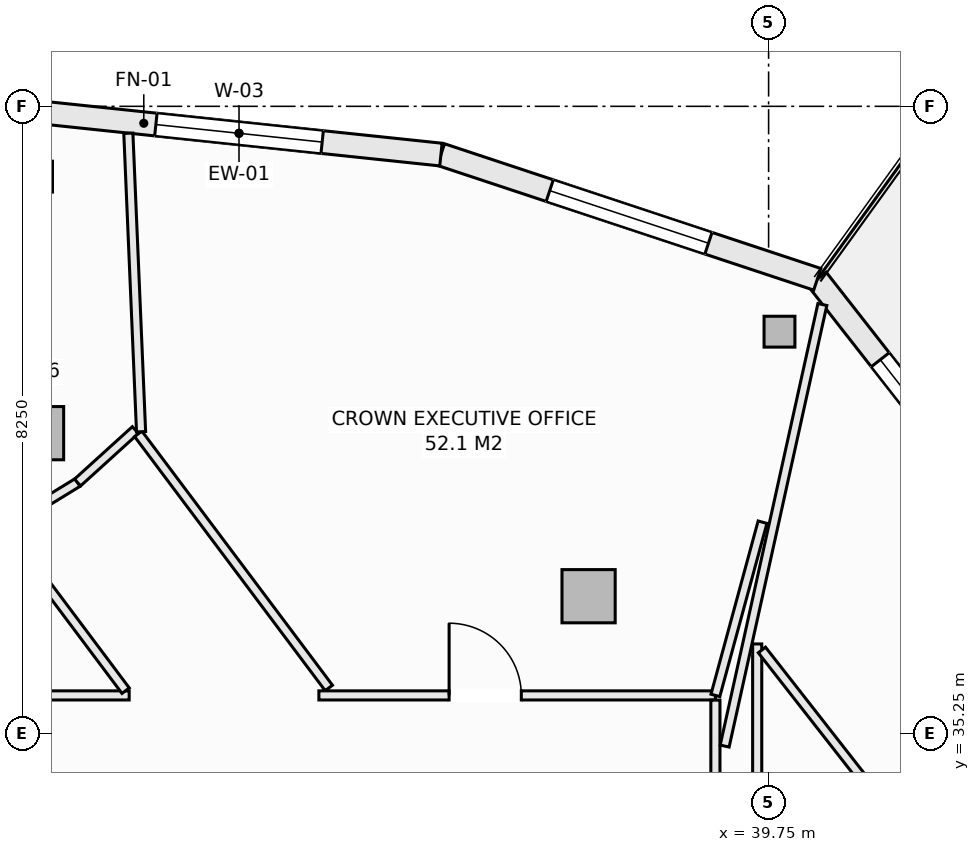
"""IFC4 building model, lengths in metres.
Left out: names, types, materials, properties, quantities, classifications, styles, units other than length and angle.
Written with IfcOpenShell. Run it as: python <this file> out.ifc"""

import sys

from ifc_helpers import new_model, si_unit, direction, frame, frame_2d, origin, origin_2d, place, context, subcontext, project, spatial, rectangle, hollow_rectangle, extrude, element, fill, save


model = new_model("IFC4")
c1 = context("Model", 3, precision=1e-05, world=origin(), true_north=direction((0.0, 1.0)))
c2 = subcontext(c1, "Body", "Model", "MODEL_VIEW")
j1 = project(units=[si_unit("LENGTHUNIT", "METRE"), si_unit("PLANEANGLEUNIT", "RADIAN")], contexts=[c1])
p1 = place(None, origin())
s1 = spatial("IfcSite", under=j1, at=p1, CompositionType="ELEMENT")
p2 = place(p1, origin())
s2 = spatial("IfcBuilding", under=s1, at=p2, CompositionType="ELEMENT")
p3 = place(p2, frame((0.0, 0.0, 259.1)))
s3 = spatial("IfcBuildingStorey", under=s2, at=p3, CompositionType="ELEMENT", Elevation=259.1)
for number, where, z_axis, x_axis in (
    (1, (39.893, 40.535, -0.27), (0.0, 0.0, 1.0), (1.0, 0.0, 0.0)),
    (2, (30.125, 42.575, -0.27), (0.0, 0.0, 1.0), (1.0, 0.0, 0.0)),
):
    element("IfcColumn", number, at=place(p3, frame(where, z_axis=z_axis, x_axis=x_axis)), inside=s3, PredefinedType="COLUMN", context=c2, shape_type="SweptSolid", body=[
        extrude(hollow_rectangle(XDim=0.406, YDim=0.406, WallThickness=0.016, at=origin_2d()), origin(), (0.0, 0.0, 1.0), 3.3),
    ])
for number, where, z_axis, x_axis in (
    (3, (37.382, 37.055, -0.27), (0.0, 0.0, 1.0), (1.0, 0.0, 0.0)),
    (4, (30.125, 39.2, -0.27), (0.0, 0.0, 1.0), (1.0, 0.0, 0.0)),
):
    element("IfcColumn", number, at=place(p3, frame(where, z_axis=z_axis, x_axis=x_axis)), inside=s3, PredefinedType="COLUMN", context=c2, shape_type="SweptSolid", body=[
        extrude(rectangle(XDim=0.7, YDim=0.7, at=origin_2d()), origin(), (0.0, 0.0, 1.0), 3.3),
    ])
p4 = place(p3, frame((40.391, 41.225, 0.0), z_axis=(0.0, 0.0, 1.0), x_axis=(0.616413297421, -0.78742278781, 0.0)))
e5 = element("IfcWall", 5, at=p4, inside=s3, PredefinedType="SOLIDWALL", context=c2, shape_type="SweptSolid", body=[
    extrude(rectangle(XDim=4.888, YDim=0.3, at=frame_2d((2.444, 0.0))), origin(), (0.0, 0.0, 1.0), 2.605),
])
p5 = place(p4, frame((1.344, 0.0, 0.72)))
e6 = element("IfcOpeningElement", 6, at=p5, cuts=e5, PredefinedType="OPENING", context=c2, shape_type="SweptSolid", body=[
    extrude(rectangle(XDim=2.2, YDim=1.65, at=frame_2d((1.1, 0.825))), frame((0.0, 0.16, 0.0), z_axis=(0.0, -1.0, 0.0), x_axis=(1.0, 0.0, 0.0)), (0.0, 0.0, 1.0), 0.32),
])
p6 = place(p3, frame((35.439, 42.865, 0.0), z_axis=(0.0, 0.0, 1.0), x_axis=(0.949252744709, -0.314514271001, 0.0)))
e7 = element("IfcWall", 7, at=p6, inside=s3, PredefinedType="SOLIDWALL", context=c2, shape_type="SweptSolid", body=[
    extrude(rectangle(XDim=5.216, YDim=0.3, at=frame_2d((2.608, 0.0))), origin(), (0.0, 0.0, 1.0), 2.605),
])
p7 = place(p6, frame((1.508, 0.0, 0.72)))
e8 = element("IfcOpeningElement", 8, at=p7, cuts=e7, PredefinedType="OPENING", context=c2, shape_type="SweptSolid", body=[
    extrude(rectangle(XDim=2.2, YDim=1.65, at=frame_2d((1.1, 0.825))), frame((0.0, 0.16, 0.0), z_axis=(0.0, -1.0, 0.0), x_axis=(1.0, 0.0, 0.0)), (0.0, 0.0, 1.0), 0.32),
])
p8 = place(p3, frame((30.125, 43.425, 0.0), z_axis=(0.0, 0.0, 1.0), x_axis=(0.9944966869, -0.104768028258, 0.0)))
e9 = element("IfcWall", 9, at=p8, inside=s3, PredefinedType="SOLIDWALL", context=c2, shape_type="SweptSolid", body=[
    extrude(rectangle(XDim=5.343, YDim=0.3, at=frame_2d((2.672, 0.0))), origin(), (0.0, 0.0, 1.0), 2.605),
])
p9 = place(p8, frame((1.572, 0.0, 0.72)))
e10 = element("IfcOpeningElement", 10, at=p9, cuts=e9, PredefinedType="OPENING", context=c2, shape_type="SweptSolid", body=[
    extrude(rectangle(XDim=2.2, YDim=1.65, at=frame_2d((1.1, 0.825))), frame((0.0, 0.16, 0.0), z_axis=(0.0, -1.0, 0.0), x_axis=(1.0, 0.0, 0.0)), (0.0, 0.0, 1.0), 0.32),
])
p10 = place(p3, frame((29.96, 38.123, 0.0), z_axis=(0.0, 0.0, 1.0), x_axis=(0.852506956574, 0.522715877885, 0.0)))
e11 = element("IfcWall", 11, at=p10, inside=s3, PredefinedType="PARTITIONING", context=c2, shape_type="SweptSolid", body=[
    extrude(rectangle(XDim=0.819, YDim=0.12, at=frame_2d((0.409, 0.0))), origin(), (0.0, 0.0, 1.0), 3.03),
])
p11 = place(p3, frame((30.658, 38.551, 0.0), z_axis=(0.0, 0.0, 1.0), x_axis=(0.74084279818, 0.671678456097, 0.0)))
e12 = element("IfcWall", 12, at=p11, inside=s3, PredefinedType="PARTITIONING", context=c2, shape_type="SweptSolid", body=[
    extrude(rectangle(XDim=1.027, YDim=0.12, at=frame_2d((0.514, 0.0))), origin(), (0.0, 0.0, 1.0), 3.03),
])
p12 = place(p3, frame((31.456, 39.191, 0.0), z_axis=(0.0, 0.0, 1.0), x_axis=(0.600056078533, -0.799957938029, 0.0)))
e13 = element("IfcWall", 13, at=p12, inside=s3, PredefinedType="PARTITIONING", context=c2, shape_type="SweptSolid", body=[
    extrude(rectangle(XDim=4.179, YDim=0.12, at=frame_2d((2.09, 0.0))), origin(), (0.0, 0.0, 1.0), 2.478),
])
p13 = place(p3, frame((30.062, 35.75, 0.0), z_axis=(0.0, 0.0, 1.0), x_axis=(1.0, 0.0, 0.0)))
e14 = element("IfcWall", 14, at=p13, inside=s3, PredefinedType="PARTITIONING", context=c2, shape_type="SweptSolid", body=[
    extrude(rectangle(XDim=1.275, YDim=0.12, at=frame_2d((0.637, 0.0))), origin(), (0.0, 0.0, 1.0), 3.03),
])
p14 = place(p3, frame((33.833, 35.75, 0.0), z_axis=(0.0, 0.0, 1.0), x_axis=(1.0, 0.0, 0.0)))
e15 = element("IfcWall", 15, at=p14, inside=s3, PredefinedType="PARTITIONING", context=c2, shape_type="SweptSolid", body=[
    extrude(rectangle(XDim=5.217, YDim=0.12, at=frame_2d((2.608, 0.0))), origin(), (0.0, 0.0, 1.0), 2.478),
])
p15 = place(p14, frame((1.713, 0.0, 0.0)))
e16 = element("IfcOpeningElement", 16, at=p15, cuts=e15, PredefinedType="OPENING", context=c2, shape_type="SweptSolid", body=[
    extrude(rectangle(XDim=0.95, YDim=2.1, at=frame_2d((0.475, 1.05))), frame((0.0, 0.07, 0.0), z_axis=(0.0, -1.0, 0.0), x_axis=(1.0, 0.0, 0.0)), (0.0, 0.0, 1.0), 0.14),
])
p16 = place(p3, frame((39.05, 33.75, 0.0), z_axis=(0.0, 0.0, 1.0), x_axis=(0.0, 1.0, 0.0)))
e17 = element("IfcWall", 17, at=p16, inside=s3, PredefinedType="PARTITIONING", context=c2, shape_type="SweptSolid", body=[
    extrude(rectangle(XDim=1.938, YDim=0.12, at=frame_2d((0.969, 0.0))), origin(), (0.0, 0.0, 1.0), 3.03),
])
p17 = place(p3, frame((39.6, 31.197, 0.0), z_axis=(0.0, 0.0, 1.0), x_axis=(0.0, 1.0, 0.0)))
e18 = element("IfcWall", 18, at=p17, inside=s3, PredefinedType="PARTITIONING", context=c2, shape_type="SweptSolid", body=[
    extrude(rectangle(XDim=5.23, YDim=0.12, at=frame_2d((2.615, 0.0))), origin(), (0.0, 0.0, 1.0), 3.03),
])
p18 = place(p3, frame((39.662, 36.348, 0.0), z_axis=(0.0, 0.0, 1.0), x_axis=(0.616212345115, -0.78758005671, 0.0)))
e19 = element("IfcWall", 19, at=p18, inside=s3, PredefinedType="PARTITIONING", context=c2, shape_type="SweptSolid", body=[
    extrude(rectangle(XDim=2.333, YDim=0.12, at=frame_2d((1.167, 0.0))), origin(), (0.0, 0.0, 1.0), 3.03),
])
p19 = place(p3, frame((30.062, 37.451, 0.0), z_axis=(0.0, 0.0, 1.0), x_axis=(0.599790195836, -0.800157310145, 0.0)))
e20 = element("IfcWall", 20, at=p19, inside=s3, PredefinedType="PARTITIONING", context=c2, shape_type="SweptSolid", body=[
    extrude(rectangle(XDim=2.048, YDim=0.12, at=frame_2d((1.024, 0.0))), origin(), (0.0, 0.0, 1.0), 3.03),
])
p20 = place(p3, frame((39.172, 35.083, 0.0), z_axis=(0.0, 0.0, 1.0), x_axis=(0.216048361883, 0.976382663369, 0.0)))
e21 = element("IfcWall", 21, at=p20, inside=s3, PredefinedType="PARTITIONING", context=c2, shape_type="SweptSolid", body=[
    extrude(rectangle(XDim=5.95, YDim=0.12, at=frame_2d((2.975, 0.0))), origin(), (0.0, 0.0, 1.0), 3.03),
])
p21 = place(p3, frame((39.05, 35.75, 0.0), z_axis=(0.0, 0.0, 1.0), x_axis=(0.262548848822, 0.964918702266, 0.0)))
e22 = element("IfcWall", 22, at=p21, inside=s3, PredefinedType="PARTITIONING", context=c2, shape_type="SweptSolid", body=[
    extrude(rectangle(XDim=2.362, YDim=0.12, at=frame_2d((1.181, 0.0))), origin(), (0.0, 0.0, 1.0), 3.03),
])
p22 = place(p3, frame((31.326, 43.146, 0.0), z_axis=(0.0, 0.0, 1.0), x_axis=(0.042550336493, -0.999094324308, 0.0)))
e23 = element("IfcWall", 23, at=p22, inside=s3, PredefinedType="PARTITIONING", context=c2, shape_type="SweptSolid", body=[
    extrude(rectangle(XDim=3.93, YDim=0.12, at=frame_2d((1.965, 0.0))), origin(), (0.0, 0.0, 1.0), 3.03),
])
p23 = place(p5, origin())
e24 = element("IfcWindow", 24, at=p23, inside=s3, PartitioningType="SINGLE_PANEL", PredefinedType="WINDOW", context=c2, shape_type="SweptSolid", body=[
    extrude(rectangle(XDim=2.2, YDim=1.65, at=frame_2d((1.1, 0.825))), frame((0.0, 0.03, 0.0), z_axis=(0.0, -1.0, 0.0), x_axis=(1.0, 0.0, 0.0)), (0.0, 0.0, 1.0), 0.06),
])
fill(e6, e24)
p24 = place(p7, origin())
e25 = element("IfcWindow", 25, at=p24, inside=s3, PartitioningType="SINGLE_PANEL", PredefinedType="WINDOW", context=c2, shape_type="SweptSolid", body=[
    extrude(rectangle(XDim=2.2, YDim=1.65, at=frame_2d((1.1, 0.825))), frame((0.0, 0.03, 0.0), z_axis=(0.0, -1.0, 0.0), x_axis=(1.0, 0.0, 0.0)), (0.0, 0.0, 1.0), 0.06),
])
fill(e8, e25)
p25 = place(p9, origin())
e26 = element("IfcWindow", 26, at=p25, inside=s3, PartitioningType="SINGLE_PANEL", PredefinedType="WINDOW", context=c2, shape_type="SweptSolid", body=[
    extrude(rectangle(XDim=2.2, YDim=1.65, at=frame_2d((1.1, 0.825))), frame((0.0, 0.03, 0.0), z_axis=(0.0, -1.0, 0.0), x_axis=(1.0, 0.0, 0.0)), (0.0, 0.0, 1.0), 0.06),
])
fill(e10, e26)
p26 = place(p15, origin())
e27 = element("IfcDoor", 27, at=p26, inside=s3, OperationType="SINGLE_SWING_LEFT", PredefinedType="DOOR", context=c2, shape_type="SweptSolid", body=[
    extrude(rectangle(XDim=0.95, YDim=2.1, at=frame_2d((0.475, 1.05))), frame((0.0, 0.025, 0.0), z_axis=(0.0, -1.0, 0.0), x_axis=(1.0, 0.0, 0.0)), (0.0, 0.0, 1.0), 0.05),
])
fill(e16, e27)
save(model, sys.argv[1])
